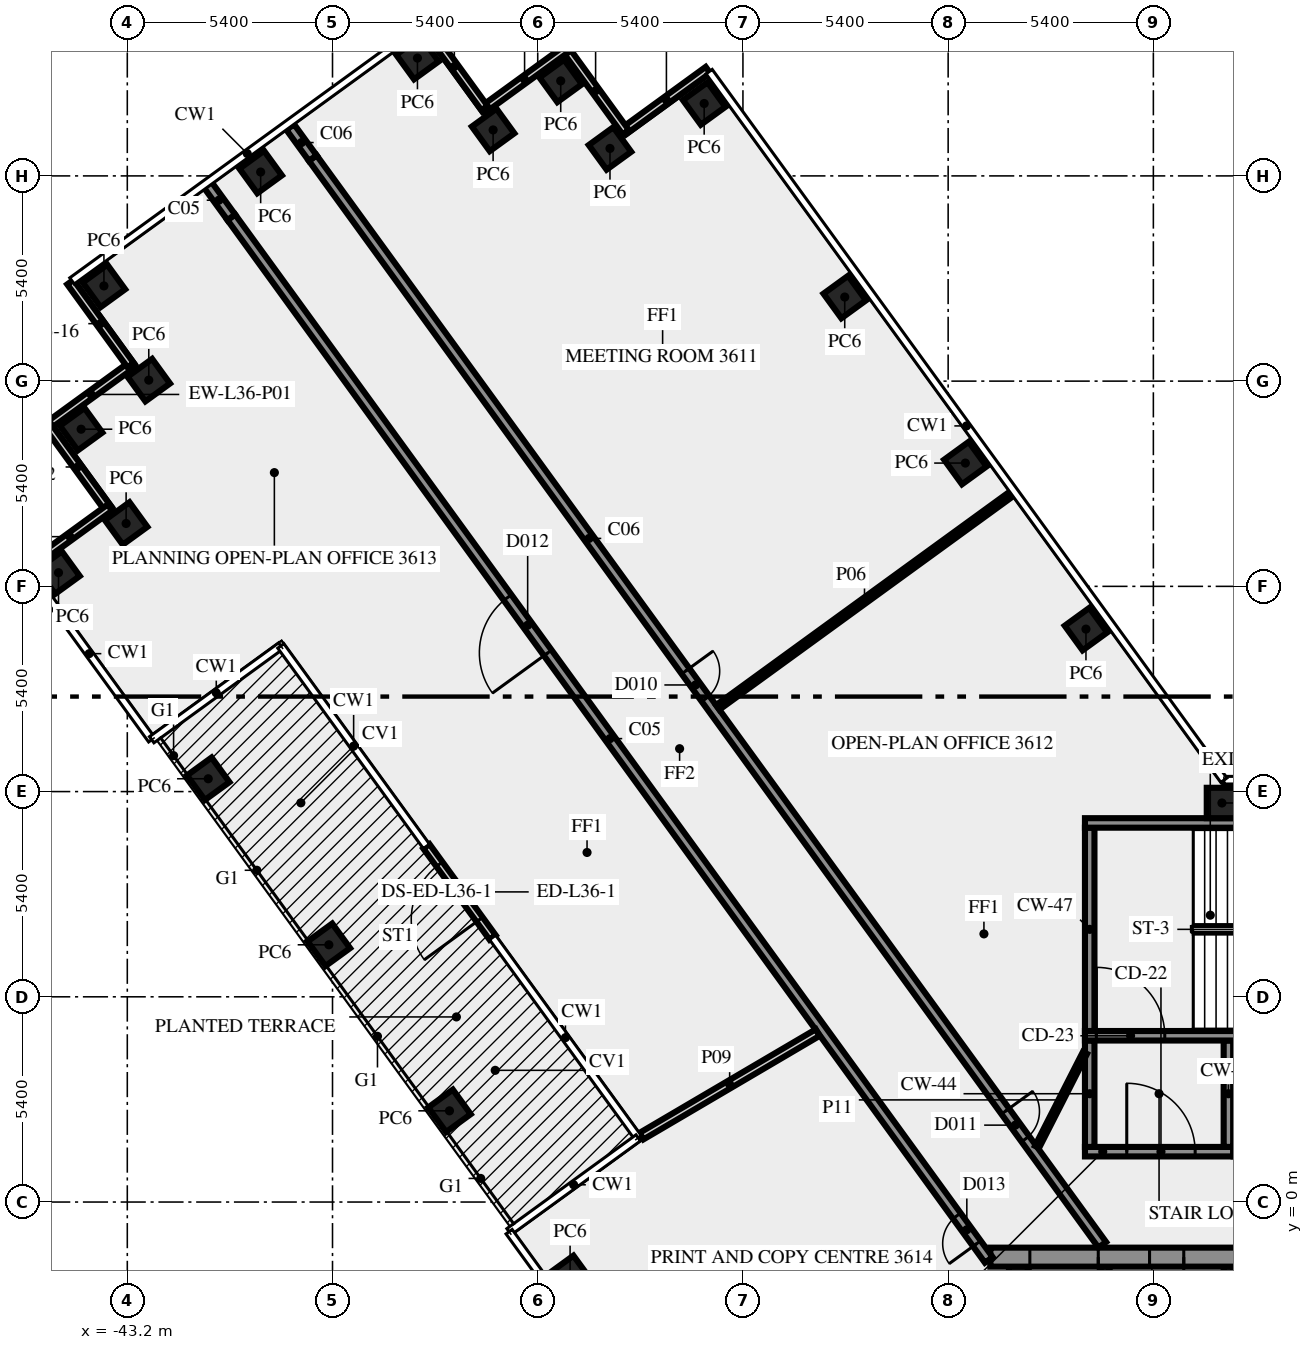
"""IFC4 building model, lengths in metres.
Left out: names, types, materials, properties, quantities, classifications, styles, units other than length and angle.
Written with IfcOpenShell. Run it as: python <this file> out.ifc"""

import sys

from ifc_helpers import new_model, si_unit, direction, frame, frame_2d, origin, origin_2d, place, context, subcontext, project, spatial, rectangle, extrude, element, fill, save


model = new_model("IFC4")
c1 = context("Model", 3, precision=1e-05, world=origin(), true_north=direction((0.0, 1.0)))
c2 = subcontext(c1, "Body", "Model", "MODEL_VIEW")
j1 = project(units=[si_unit("LENGTHUNIT", "METRE"), si_unit("PLANEANGLEUNIT", "RADIAN")], contexts=[c1])
p1 = place(None, origin())
s1 = spatial("IfcSite", under=j1, at=p1, CompositionType="ELEMENT")
p2 = place(p1, origin())
s2 = spatial("IfcBuilding", under=s1, at=p2, CompositionType="ELEMENT")
p3 = place(p2, frame((0.0, 0.0, 156.0)))
s3 = spatial("IfcBuildingStorey", under=s2, at=p3, CompositionType="ELEMENT", Elevation=156.0)
for number, where, z_axis, x_axis in (
    (1, (-17.974, 15.075, 0.0), (0.0, 0.0, 1.0), (-0.588, 0.809, 0.0)),
    (2, (-21.147, 19.444, 0.0), (0.0, 0.0, 1.0), (-0.588, 0.809, 0.0)),
    (3, (-24.321, 23.812, 0.0), (0.0, 0.0, 1.0), (-0.588, 0.809, 0.0)),
    (4, (-28.02, 28.905, 0.0), (0.0, 0.0, 1.0), (-0.809, -0.588, 0.0)),
    (5, (-30.499, 27.723, 0.0), (0.0, 0.0, 1.0), (-0.809, -0.588, 0.0)),
    (6, (-31.795, 29.5, 0.0), (0.0, 0.0, 1.0), (-0.588, 0.809, 0.0)),
    (7, (-33.574, 28.209, 0.0), (0.0, 0.0, 1.0), (-0.588, 0.809, 0.0)),
    (8, (-35.565, 30.1, 0.0), (0.0, 0.0, 1.0), (-0.809, -0.588, 0.0)),
    (9, (-39.691, 27.102, 0.0), (0.0, 0.0, 1.0), (-0.809, -0.588, 0.0)),
    (10, (-43.815, 24.105, 0.0), (0.0, 0.0, 1.0), (-0.809, -0.588, 0.0)),
    (11, (-42.635, 21.626, 0.0), (0.0, 0.0, 1.0), (-0.809, -0.588, 0.0)),
    (12, (-44.415, 20.335, 0.0), (0.0, 0.0, 1.0), (0.588, -0.809, 0.0)),
    (13, (-43.231, 17.854, 0.0), (0.0, 0.0, 1.0), (0.588, -0.809, 0.0)),
    (14, (-45.01, 16.56, 0.0), (0.0, 0.0, 1.0), (0.588, -0.809, 0.0)),
    (15, (-41.07, 11.137, 0.0), (0.0, 0.0, 1.0), (0.588, -0.809, 0.0)),
    (16, (-37.896, 6.769, 0.0), (0.0, 0.0, 1.0), (0.588, -0.809, 0.0)),
    (17, (-34.722, 2.4, 0.0), (0.0, 0.0, 1.0), (0.588, -0.809, 0.0)),
    (18, (-31.548, -1.969, 0.0), (0.0, 0.0, 1.0), (0.588, -0.809, 0.0)),
    (19, (-14.395, 10.5, 0.0), (0.0, 0.0, 1.0), (-1.0, 0.0, 0.0)),
):
    element("IfcColumn", number, at=place(p3, frame(where, z_axis=z_axis, x_axis=x_axis)), inside=s3, PredefinedType="COLUMN", context=c2, shape_type="SweptSolid", body=[
        extrude(rectangle(XDim=0.8, YDim=0.8, at=origin_2d()), origin(), (0.0, 0.0, 1.0), 3.65),
    ])
p4 = place(p3, frame((-33.587, 6.962, 0.0), z_axis=(0.0, 0.0, 1.0), x_axis=(-0.587774760134, 0.809024617271, 0.0)))
e20 = element("IfcWall", 20, at=p4, inside=s3, PredefinedType="SOLIDWALL", context=c2, shape_type="SweptSolid", body=[
    extrude(rectangle(XDim=2.963, YDim=0.2, at=frame_2d((1.481, 0.0))), origin(), (0.0, 0.0, 1.0), 3.65),
])
p5 = place(p4, frame((0.582, 0.0, 0.0)))
e21 = element("IfcOpeningElement", 21, at=p5, cuts=e20, PredefinedType="OPENING", context=c2, shape_type="SweptSolid", body=[
    extrude(rectangle(XDim=1.8, YDim=2.4, at=frame_2d((0.9, 1.2))), frame((0.0, 0.11, 0.0), z_axis=(0.0, -1.0, 0.0), x_axis=(1.0, 0.0, 0.0)), (0.0, 0.0, 1.0), 0.22),
])
for number, where, z_axis, x_axis in (
    (22, (-43.061, 22.043, 0.0), (0.0, 0.0, 1.0), (-0.809, -0.588, 0.0)),
    (23, (-45.296, 20.434, 0.0), (0.0, 0.0, 1.0), (0.588, -0.809, 0.0)),
):
    element("IfcWall", number, at=place(p3, frame(where, z_axis=z_axis, x_axis=x_axis)), inside=s3, PredefinedType="SOLIDWALL", context=c2, shape_type="SweptSolid", body=[
        extrude(rectangle(XDim=2.7, YDim=0.2, at=frame_2d((1.35, 0.0))), origin(), (0.0, 0.0, 1.0), 3.65),
    ])
p6 = place(p3, frame((-43.658, 18.272, 0.0), z_axis=(0.0, 0.0, 1.0), x_axis=(-0.808979656733, -0.587836639716, 0.0)))
e24 = element("IfcWall", 24, at=p6, inside=s3, PredefinedType="SOLIDWALL", context=c2, shape_type="SweptSolid", body=[
    extrude(rectangle(XDim=2.6, YDim=0.2, at=frame_2d((1.3, 0.0))), origin(), (0.0, 0.0, 1.0), 3.65),
])
for number, where, z_axis, x_axis in (
    (25, (-27.921, 29.787, 0.0), (0.0, 0.0, 1.0), (-0.809, -0.588, 0.0)),
    (26, (-30.083, 28.149, 0.0), (0.0, 0.0, 1.0), (-0.588, 0.809, 0.0)),
    (27, (-31.654, 30.331, 0.0), (0.0, 0.0, 1.0), (-0.809, -0.588, 0.0)),
    (28, (-33.801, 28.786, 0.0), (0.0, 0.0, 1.0), (-0.588, 0.809, 0.0)),
    (29, (-44.699, 24.205, 0.0), (0.0, 0.0, 1.0), (0.588, -0.809, 0.0)),
):
    element("IfcWall", number, at=place(p3, frame(where, z_axis=z_axis, x_axis=x_axis)), inside=s3, PredefinedType="SOLIDWALL", context=c2, shape_type="SweptSolid", body=[
        extrude(rectangle(XDim=2.7, YDim=0.2, at=frame_2d((1.35, 0.0))), origin(), (0.0, 0.0, 1.0), 3.65),
    ])
p7 = place(p3, frame((-19.75, -10.5, 0.0), z_axis=(0.0, 0.0, 1.0), x_axis=(0.0, 1.0, 0.0)))
e30 = element("IfcWall", 30, at=p7, inside=s3, PredefinedType="SHEAR", context=c2, shape_type="SweptSolid", body=[
    extrude(rectangle(XDim=8.8, YDim=0.5, at=frame_2d((4.4, 0.0))), origin(), (0.0, 0.0, 1.0), 3.65),
])
p8 = place(p3, frame((-17.475, -6.0, 0.0), z_axis=(0.0, 0.0, 1.0), x_axis=(0.0, 1.0, 0.0)))
e31 = element("IfcWall", 31, at=p8, inside=s3, PredefinedType="SHEAR", context=c2, shape_type="SweptSolid", body=[
    extrude(rectangle(XDim=4.3, YDim=0.25, at=frame_2d((2.15, 0.0))), origin(), (0.0, 0.0, 1.0), 3.65),
])
p9 = place(p8, frame((0.55, 0.0, 0.0)))
e32 = element("IfcOpeningElement", 32, at=p9, cuts=e31, PredefinedType="OPENING", context=c2, shape_type="SweptSolid", body=[
    extrude(rectangle(XDim=1.3, YDim=2.1, at=frame_2d((0.65, 1.05))), frame((0.0, 0.135, 0.0), z_axis=(0.0, -1.0, 0.0), x_axis=(1.0, 0.0, 0.0)), (0.0, 0.0, 1.0), 0.27),
])
p10 = place(p3, frame((-14.225, -6.0, 0.0), z_axis=(0.0, 0.0, 1.0), x_axis=(0.0, 1.0, 0.0)))
e33 = element("IfcWall", 33, at=p10, inside=s3, PredefinedType="SHEAR", context=c2, shape_type="SweptSolid", body=[
    extrude(rectangle(XDim=4.3, YDim=0.25, at=frame_2d((2.15, 0.0))), origin(), (0.0, 0.0, 1.0), 3.65),
])
p11 = place(p3, frame((20.49, -1.45, 0.0), z_axis=(0.0, 0.0, 1.0), x_axis=(-1.0, 0.0, 0.0)))
e34 = element("IfcWall", 34, at=p11, inside=s3, PredefinedType="SHEAR", context=c2, shape_type="SweptSolid", body=[
    extrude(rectangle(XDim=40.98, YDim=0.5, at=frame_2d((20.49, 0.0))), origin(), (0.0, 0.0, 1.0), 3.65),
])
p12 = place(p11, frame((38.14, 0.0, 0.0)))
e35 = element("IfcOpeningElement", 35, at=p12, cuts=e34, PredefinedType="OPENING", context=c2, shape_type="SweptSolid", body=[
    extrude(rectangle(XDim=1.8, YDim=2.1, at=frame_2d((0.9, 1.05))), frame((0.0, 0.26, 0.0), z_axis=(0.0, -1.0, 0.0), x_axis=(1.0, 0.0, 0.0)), (0.0, 0.0, 1.0), 0.52),
])
p13 = place(p11, frame((35.89, 0.0, 0.0)))
e36 = element("IfcOpeningElement", 36, at=p13, cuts=e34, PredefinedType="OPENING", context=c2, shape_type="SweptSolid", body=[
    extrude(rectangle(XDim=0.9, YDim=2.1, at=frame_2d((0.45, 1.05))), frame((0.0, 0.26, 0.0), z_axis=(0.0, -1.0, 0.0), x_axis=(1.0, 0.0, 0.0)), (0.0, 0.0, 1.0), 0.52),
])
p14 = place(p11, frame((32.94, 0.0, 0.0)))
e37 = element("IfcOpeningElement", 37, at=p14, cuts=e34, PredefinedType="OPENING", context=c2, shape_type="SweptSolid", body=[
    extrude(rectangle(XDim=0.9, YDim=2.1, at=frame_2d((0.45, 1.05))), frame((0.0, 0.26, 0.0), z_axis=(0.0, -1.0, 0.0), x_axis=(1.0, 0.0, 0.0)), (0.0, 0.0, 1.0), 0.52),
])
p15 = place(p11, frame((28.802, 0.0, 0.0)))
e38 = element("IfcOpeningElement", 38, at=p15, cuts=e34, PredefinedType="OPENING", context=c2, shape_type="SweptSolid", body=[
    extrude(rectangle(XDim=0.9, YDim=2.1, at=frame_2d((0.45, 1.05))), frame((0.0, 0.26, 0.0), z_axis=(0.0, -1.0, 0.0), x_axis=(1.0, 0.0, 0.0)), (0.0, 0.0, 1.0), 0.52),
])
p16 = place(p11, frame((25.077, 0.0, 0.0)))
e39 = element("IfcOpeningElement", 39, at=p16, cuts=e34, PredefinedType="OPENING", context=c2, shape_type="SweptSolid", body=[
    extrude(rectangle(XDim=0.9, YDim=2.1, at=frame_2d((0.45, 1.05))), frame((0.0, 0.26, 0.0), z_axis=(0.0, -1.0, 0.0), x_axis=(1.0, 0.0, 0.0)), (0.0, 0.0, 1.0), 0.52),
])
p17 = place(p11, frame((21.765, 0.0, 0.0)))
e40 = element("IfcOpeningElement", 40, at=p17, cuts=e34, PredefinedType="OPENING", context=c2, shape_type="SweptSolid", body=[
    extrude(rectangle(XDim=2.0, YDim=2.1, at=frame_2d((1.0, 1.05))), frame((0.0, 0.26, 0.0), z_axis=(0.0, -1.0, 0.0), x_axis=(1.0, 0.0, 0.0)), (0.0, 0.0, 1.0), 0.52),
])
p18 = place(p11, frame((7.14, 0.0, 0.0)))
e41 = element("IfcOpeningElement", 41, at=p18, cuts=e34, PredefinedType="OPENING", context=c2, shape_type="SweptSolid", body=[
    extrude(rectangle(XDim=0.9, YDim=2.1, at=frame_2d((0.45, 1.05))), frame((0.0, 0.26, 0.0), z_axis=(0.0, -1.0, 0.0), x_axis=(1.0, 0.0, 0.0)), (0.0, 0.0, 1.0), 0.52),
])
p19 = place(p11, frame((5.028, 0.0, 0.0)))
e42 = element("IfcOpeningElement", 42, at=p19, cuts=e34, PredefinedType="OPENING", context=c2, shape_type="SweptSolid", body=[
    extrude(rectangle(XDim=0.8, YDim=2.1, at=frame_2d((0.4, 1.05))), frame((0.0, 0.26, 0.0), z_axis=(0.0, -1.0, 0.0), x_axis=(1.0, 0.0, 0.0)), (0.0, 0.0, 1.0), 0.52),
])
p20 = place(p11, frame((3.452, 0.0, 0.0)))
e43 = element("IfcOpeningElement", 43, at=p20, cuts=e34, PredefinedType="OPENING", context=c2, shape_type="SweptSolid", body=[
    extrude(rectangle(XDim=0.8, YDim=2.1, at=frame_2d((0.4, 1.05))), frame((0.0, 0.26, 0.0), z_axis=(0.0, -1.0, 0.0), x_axis=(1.0, 0.0, 0.0)), (0.0, 0.0, 1.0), 0.52),
])
p21 = place(p11, frame((1.04, 0.0, 0.0)))
e44 = element("IfcOpeningElement", 44, at=p21, cuts=e34, PredefinedType="OPENING", context=c2, shape_type="SweptSolid", body=[
    extrude(rectangle(XDim=1.8, YDim=2.1, at=frame_2d((0.9, 1.05))), frame((0.0, 0.26, 0.0), z_axis=(0.0, -1.0, 0.0), x_axis=(1.0, 0.0, 0.0)), (0.0, 0.0, 1.0), 0.52),
])
p22 = place(p3, frame((-18.0, 1.325, 0.0), z_axis=(0.0, 0.0, 1.0), x_axis=(1.0, 0.0, 0.0)))
e45 = element("IfcWall", 45, at=p22, inside=s3, PredefinedType="SHEAR", context=c2, shape_type="SweptSolid", body=[
    extrude(rectangle(XDim=3.9, YDim=0.25, at=frame_2d((1.95, 0.0))), origin(), (0.0, 0.0, 1.0), 3.65),
])
p23 = place(p22, frame((1.1, 0.0, 0.0)))
e46 = element("IfcOpeningElement", 46, at=p23, cuts=e45, PredefinedType="OPENING", context=c2, shape_type="SweptSolid", body=[
    extrude(rectangle(XDim=1.8, YDim=2.1, at=frame_2d((0.9, 1.05))), frame((0.0, 0.135, 0.0), z_axis=(0.0, -1.0, 0.0), x_axis=(1.0, 0.0, 0.0)), (0.0, 0.0, 1.0), 0.27),
])
for number, where, z_axis, x_axis in (
    (47, (-17.875, 1.45, 0.0), (0.0, 0.0, 1.0), (0.0, 1.0, 0.0)),
    (48, (-14.225, 1.45, 0.0), (0.0, 0.0, 1.0), (0.0, 1.0, 0.0)),
):
    element("IfcWall", number, at=place(p3, frame(where, z_axis=z_axis, x_axis=x_axis)), inside=s3, PredefinedType="SHEAR", context=c2, shape_type="SweptSolid", body=[
        extrude(rectangle(XDim=2.8, YDim=0.25, at=frame_2d((1.4, 0.0))), origin(), (0.0, 0.0, 1.0), 3.65),
    ])
p24 = place(p3, frame((-18.0, 4.375, 0.0), z_axis=(0.0, 0.0, 1.0), x_axis=(1.0, 0.0, 0.0)))
e49 = element("IfcWall", 49, at=p24, inside=s3, PredefinedType="SHEAR", context=c2, shape_type="SweptSolid", body=[
    extrude(rectangle(XDim=10.5, YDim=0.25, at=frame_2d((5.25, 0.0))), origin(), (0.0, 0.0, 1.0), 3.65),
])
p25 = place(p24, frame((0.3, 0.0, 0.0)))
e50 = element("IfcOpeningElement", 50, at=p25, cuts=e49, PredefinedType="OPENING", context=c2, shape_type="SweptSolid", body=[
    extrude(rectangle(XDim=1.8, YDim=2.1, at=frame_2d((0.9, 1.05))), frame((0.0, 0.135, 0.0), z_axis=(0.0, -1.0, 0.0), x_axis=(1.0, 0.0, 0.0)), (0.0, 0.0, 1.0), 0.27),
])
p26 = place(p3, frame((-17.875, 4.5, 0.0), z_axis=(0.0, 0.0, 1.0), x_axis=(0.0, 1.0, 0.0)))
e51 = element("IfcWall", 51, at=p26, inside=s3, PredefinedType="SHEAR", context=c2, shape_type="SweptSolid", body=[
    extrude(rectangle(XDim=5.35, YDim=0.25, at=frame_2d((2.675, 0.0))), origin(), (0.0, 0.0, 1.0), 3.65),
])
p27 = place(p3, frame((-18.0, 9.975, 0.0), z_axis=(0.0, 0.0, 1.0), x_axis=(1.0, 0.0, 0.0)))
e52 = element("IfcWall", 52, at=p27, inside=s3, PredefinedType="SHEAR", context=c2, shape_type="SweptSolid", body=[
    extrude(rectangle(XDim=10.5, YDim=0.25, at=frame_2d((5.25, 0.0))), origin(), (0.0, 0.0, 1.0), 3.65),
])
p28 = place(p27, frame((4.5, 0.0, 1.0)))
e53 = element("IfcOpeningElement", 53, at=p28, cuts=e52, PredefinedType="OPENING", context=c2, shape_type="SweptSolid", body=[
    extrude(rectangle(XDim=1.2, YDim=1.2, at=frame_2d((0.6, 0.6))), frame((0.0, 0.135, 0.0), z_axis=(0.0, -1.0, 0.0), x_axis=(1.0, 0.0, 0.0)), (0.0, 0.0, 1.0), 0.27),
])
p29 = place(p3, frame((-20.531, -1.523, 0.0), z_axis=(0.0, 0.0, 1.0), x_axis=(-0.587781654618, 0.809019608226, 0.0)))
e54 = element("IfcWall", 54, at=p29, inside=s3, PredefinedType="SOLIDWALL", context=c2, shape_type="SweptSolid", body=[
    extrude(rectangle(XDim=33.911, YDim=0.25, at=frame_2d((16.956, 0.0))), origin(), (0.0, 0.0, 1.0), 3.65),
])
p30 = place(p29, frame((19.743, 0.0, 0.0)))
e55 = element("IfcOpeningElement", 55, at=p30, cuts=e54, PredefinedType="OPENING", context=c2, shape_type="SweptSolid", body=[
    extrude(rectangle(XDim=1.8, YDim=2.1, at=frame_2d((0.9, 1.05))), frame((0.0, 0.135, 0.0), z_axis=(0.0, -1.0, 0.0), x_axis=(1.0, 0.0, 0.0)), (0.0, 0.0, 1.0), 0.27),
])
p31 = place(p29, frame((0.533, 0.0, 0.0)))
e56 = element("IfcOpeningElement", 56, at=p31, cuts=e54, PredefinedType="OPENING", context=c2, shape_type="SweptSolid", body=[
    extrude(rectangle(XDim=0.9, YDim=2.1, at=frame_2d((0.45, 1.05))), frame((0.0, 0.135, 0.0), z_axis=(0.0, -1.0, 0.0), x_axis=(1.0, 0.0, 0.0)), (0.0, 0.0, 1.0), 0.27),
])
p32 = place(p3, frame((-38.32, 27.469, 0.0), z_axis=(0.0, 0.0, 1.0), x_axis=(0.587788021768, -0.809014982226, 0.0)))
e57 = element("IfcWall", 57, at=p32, inside=s3, PredefinedType="SOLIDWALL", context=c2, shape_type="SweptSolid", body=[
    extrude(rectangle(XDim=35.344, YDim=0.25, at=frame_2d((17.672, 0.0))), origin(), (0.0, 0.0, 1.0), 3.65),
])
p33 = place(p32, frame((31.003, 0.0, 0.0)))
e58 = element("IfcOpeningElement", 58, at=p33, cuts=e57, PredefinedType="OPENING", context=c2, shape_type="SweptSolid", body=[
    extrude(rectangle(XDim=0.9, YDim=2.1, at=frame_2d((0.45, 1.05))), frame((0.0, 0.135, 0.0), z_axis=(0.0, -1.0, 0.0), x_axis=(1.0, 0.0, 0.0)), (0.0, 0.0, 1.0), 0.27),
])
p34 = place(p32, frame((16.687, 0.0, 0.0)))
e59 = element("IfcOpeningElement", 59, at=p34, cuts=e57, PredefinedType="OPENING", context=c2, shape_type="SweptSolid", body=[
    extrude(rectangle(XDim=0.9, YDim=2.1, at=frame_2d((0.45, 1.05))), frame((0.0, 0.135, 0.0), z_axis=(0.0, -1.0, 0.0), x_axis=(1.0, 0.0, 0.0)), (0.0, 0.0, 1.0), 0.27),
])
p35 = place(p3, frame((-19.938, 18.629, 0.0), z_axis=(0.0, 0.0, 1.0), x_axis=(-0.80900684162, -0.587799226107, 0.0)))
e60 = element("IfcWall", 60, at=p35, inside=s3, PredefinedType="PARTITIONING", context=c2, shape_type="SweptSolid", body=[
    extrude(rectangle(XDim=9.55, YDim=0.15, at=frame_2d((4.775, 0.0))), origin(), (0.0, 0.0, 1.0), 2.85),
])
p36 = place(p3, frame((-29.668, 1.735, 0.0), z_axis=(0.0, 0.0, 1.0), x_axis=(0.862172227296, 0.506615288439, 0.0)))
e61 = element("IfcWall", 61, at=p36, inside=s3, PredefinedType="SOLIDWALL", context=c2, shape_type="SweptSolid", body=[
    extrude(rectangle(XDim=5.377, YDim=0.2, at=frame_2d((2.688, 0.0))), origin(), (0.0, 0.0, 1.0), 3.65),
])
p37 = place(p3, frame((-19.261, 1.45, 0.0), z_axis=(0.0, 0.0, 1.0), x_axis=(0.453950796792, 0.891026752736, 0.0)))
e62 = element("IfcWall", 62, at=p37, inside=s3, PredefinedType="PARTITIONING", context=c2, shape_type="SweptSolid", body=[
    extrude(rectangle(XDim=2.778, YDim=0.12, at=frame_2d((1.389, 0.0))), origin(), (0.0, 0.0, 1.0), 3.65),
])
p38 = place(p3, frame((-40.463, 25.911, 0.0), z_axis=(0.0, 0.0, 1.0), x_axis=(-0.587792454268, 0.809011761785, 0.0)))
e63 = element("IfcWall", 63, at=p38, inside=s3, PredefinedType="SOLIDWALL", context=c2, shape_type="SweptSolid", body=[
    extrude(rectangle(XDim=1.11, YDim=0.25, at=frame_2d((0.555, 0.0))), origin(), (0.0, 0.0, 1.0), 2.85),
])
p39 = place(p3, frame((-38.32, 27.469, 0.0), z_axis=(0.0, 0.0, 1.0), x_axis=(-0.587811913486, 0.808997623213, 0.0)))
e64 = element("IfcWall", 64, at=p39, inside=s3, PredefinedType="SOLIDWALL", context=c2, shape_type="SweptSolid", body=[
    extrude(rectangle(XDim=1.009, YDim=0.25, at=frame_2d((0.504, 0.0))), origin(), (0.0, 0.0, 1.0), 2.85),
])
p40 = place(p5, origin())
e65 = element("IfcDoor", 65, at=p40, inside=s3, OperationType="DOUBLE_DOOR_SINGLE_SWING", PredefinedType="DOOR", context=c2, shape_type="SweptSolid", body=[
    extrude(rectangle(XDim=1.8, YDim=2.4, at=frame_2d((0.9, 1.2))), frame((0.0, 0.025, 0.0), z_axis=(0.0, -1.0, 0.0), x_axis=(1.0, 0.0, 0.0)), (0.0, 0.0, 1.0), 0.05),
])
fill(e21, e65)
p41 = place(p12, origin())
e66 = element("IfcDoor", 66, at=p41, inside=s3, OperationType="DOUBLE_DOOR_SINGLE_SWING", PredefinedType="DOOR", context=c2, shape_type="SweptSolid", body=[
    extrude(rectangle(XDim=1.8, YDim=2.1, at=frame_2d((0.9, 1.05))), frame((0.0, 0.025, 0.0), z_axis=(0.0, -1.0, 0.0), x_axis=(1.0, 0.0, 0.0)), (0.0, 0.0, 1.0), 0.05),
])
fill(e35, e66)
p42 = place(p13, origin())
e67 = element("IfcDoor", 67, at=p42, inside=s3, OperationType="SINGLE_SWING_RIGHT", PredefinedType="DOOR", context=c2, shape_type="SweptSolid", body=[
    extrude(rectangle(XDim=0.9, YDim=2.1, at=frame_2d((0.45, 1.05))), frame((0.0, 0.025, 0.0), z_axis=(0.0, -1.0, 0.0), x_axis=(1.0, 0.0, 0.0)), (0.0, 0.0, 1.0), 0.05),
])
fill(e36, e67)
p43 = place(p23, origin())
e68 = element("IfcDoor", 68, at=p43, inside=s3, OperationType="DOUBLE_DOOR_SINGLE_SWING", PredefinedType="DOOR", context=c2, shape_type="SweptSolid", body=[
    extrude(rectangle(XDim=1.8, YDim=2.1, at=frame_2d((0.9, 1.05))), frame((0.0, 0.025, 0.0), z_axis=(0.0, -1.0, 0.0), x_axis=(1.0, 0.0, 0.0)), (0.0, 0.0, 1.0), 0.05),
])
fill(e46, e68)
p44 = place(p25, origin())
e69 = element("IfcDoor", 69, at=p44, inside=s3, OperationType="DOUBLE_DOOR_SINGLE_SWING", PredefinedType="DOOR", context=c2, shape_type="SweptSolid", body=[
    extrude(rectangle(XDim=1.8, YDim=2.1, at=frame_2d((0.9, 1.05))), frame((0.0, 0.025, 0.0), z_axis=(0.0, -1.0, 0.0), x_axis=(1.0, 0.0, 0.0)), (0.0, 0.0, 1.0), 0.05),
])
fill(e50, e69)
p45 = place(p33, origin())
e70 = element("IfcDoor", 70, at=p45, inside=s3, OperationType="SINGLE_SWING_RIGHT", PredefinedType="DOOR", context=c2, shape_type="SweptSolid", body=[
    extrude(rectangle(XDim=0.9, YDim=2.1, at=frame_2d((0.45, 1.05))), frame((0.0, 0.025, 0.0), z_axis=(0.0, -1.0, 0.0), x_axis=(1.0, 0.0, 0.0)), (0.0, 0.0, 1.0), 0.05),
])
fill(e58, e70)
p46 = place(p34, origin())
e71 = element("IfcDoor", 71, at=p46, inside=s3, OperationType="SINGLE_SWING_RIGHT", PredefinedType="DOOR", context=c2, shape_type="SweptSolid", body=[
    extrude(rectangle(XDim=0.9, YDim=2.1, at=frame_2d((0.45, 1.05))), frame((0.0, 0.025, 0.0), z_axis=(0.0, -1.0, 0.0), x_axis=(1.0, 0.0, 0.0)), (0.0, 0.0, 1.0), 0.05),
])
fill(e59, e71)
p47 = place(p30, origin())
e72 = element("IfcDoor", 72, at=p47, inside=s3, OperationType="DOUBLE_DOOR_SINGLE_SWING", PredefinedType="DOOR", context=c2, shape_type="SweptSolid", body=[
    extrude(rectangle(XDim=1.8, YDim=2.1, at=frame_2d((0.9, 1.05))), frame((0.0, 0.025, 0.0), z_axis=(0.0, -1.0, 0.0), x_axis=(1.0, 0.0, 0.0)), (0.0, 0.0, 1.0), 0.05),
])
fill(e55, e72)
p48 = place(p31, origin())
e73 = element("IfcDoor", 73, at=p48, inside=s3, OperationType="SINGLE_SWING_LEFT", PredefinedType="DOOR", context=c2, shape_type="SweptSolid", body=[
    extrude(rectangle(XDim=0.9, YDim=2.1, at=frame_2d((0.45, 1.05))), frame((0.0, 0.025, 0.0), z_axis=(0.0, -1.0, 0.0), x_axis=(1.0, 0.0, 0.0)), (0.0, 0.0, 1.0), 0.05),
])
fill(e56, e73)
save(model, sys.argv[1])
